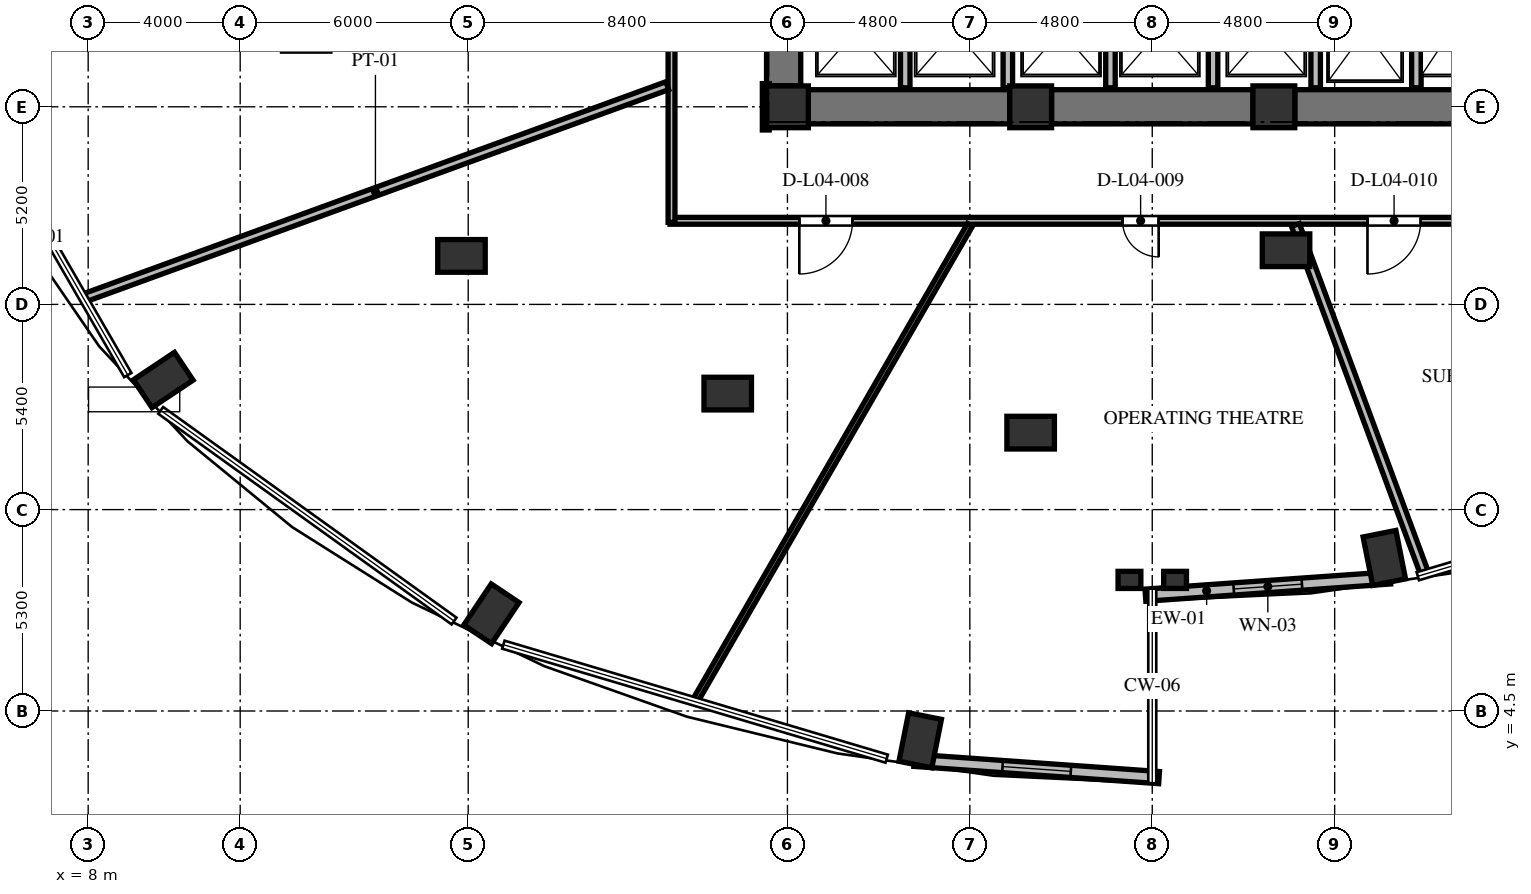
"""IFC4 building model, lengths in metres.
Left out: names, types, materials, properties, quantities, classifications, styles, units other than length and angle.
Written with IfcOpenShell. Run it as: python <this file> out.ifc"""

import sys

from ifc_helpers import new_model, si_unit, direction, frame, frame_2d, origin, origin_2d, place, context, subcontext, project, spatial, rectangle, extrude, element, fill, save


model = new_model("IFC4")
c1 = context("Model", 3, precision=1e-05, world=origin(), true_north=direction((0.0, 1.0)))
c2 = subcontext(c1, "Body", "Model", "MODEL_VIEW")
j1 = project(units=[si_unit("LENGTHUNIT", "METRE"), si_unit("PLANEANGLEUNIT", "RADIAN")], contexts=[c1])
p1 = place(None, origin())
s1 = spatial("IfcSite", under=j1, at=p1, CompositionType="ELEMENT")
p2 = place(p1, origin())
s2 = spatial("IfcBuilding", under=s1, at=p2, CompositionType="ELEMENT")
p3 = place(p2, frame((0.0, 0.0, 20.4)))
s3 = spatial("IfcBuildingStorey", under=s2, at=p3, CompositionType="ELEMENT", Elevation=20.4)
for number, where, z_axis, x_axis in (
    (1, (42.106, 8.529, 0.0), (0.0, 0.0, 1.0), (0.195, -0.981, 0.0)),
    (2, (9.975, 13.211, 0.0), (0.0, 0.0, 1.0), (-0.831, -0.556, 0.0)),
    (3, (18.611, 7.058, 0.0), (0.0, 0.0, 1.0), (-0.556, -0.831, 0.0)),
    (4, (29.894, 3.729, 0.0), (0.0, 0.0, 1.0), (-0.195, -0.981, 0.0)),
):
    element("IfcColumn", number, at=place(p3, frame(where, z_axis=z_axis, x_axis=x_axis)), inside=s3, PredefinedType="COLUMN", context=c2, shape_type="SweptSolid", body=[
        extrude(rectangle(XDim=1.3, YDim=0.88, at=origin_2d()), origin(), (0.0, 0.0, 1.0), 4.8),
    ])
for number, where, z_axis, x_axis in (
    (5, (26.4, 20.4, 0.0), (0.0, 0.0, 1.0), (1.0, 0.0, 0.0)),
    (6, (32.8, 20.4, 0.0), (0.0, 0.0, 1.0), (1.0, 0.0, 0.0)),
    (7, (39.2, 20.4, 0.0), (0.0, 0.0, 1.0), (1.0, 0.0, 0.0)),
):
    element("IfcColumn", number, at=place(p3, frame(where, z_axis=z_axis, x_axis=x_axis)), inside=s3, PredefinedType="COLUMN", context=c2, shape_type="SweptSolid", body=[
        extrude(rectangle(XDim=1.1, YDim=1.1, at=origin_2d()), origin(), (0.0, 0.0, 1.0), 4.8),
    ])
for number, where, z_axis, x_axis in (
    (8, (39.52, 16.625, 0.0), (0.0, 0.0, 1.0), (1.0, 0.0, 0.0)),
    (9, (17.823, 16.476, 0.0), (0.0, 0.0, 1.0), (1.0, 0.0, 0.0)),
    (10, (24.829, 12.853, 0.0), (0.0, 0.0, 1.0), (1.0, 0.0, 0.0)),
    (11, (32.8, 11.825, 0.0), (0.0, 0.0, 1.0), (1.0, 0.0, 0.0)),
):
    element("IfcColumn", number, at=place(p3, frame(where, z_axis=z_axis, x_axis=x_axis)), inside=s3, PredefinedType="COLUMN", context=c2, shape_type="SweptSolid", body=[
        extrude(rectangle(XDim=1.25, YDim=0.86, at=origin_2d()), origin(), (0.0, 0.0, 1.0), 4.8),
    ])
for number, where, z_axis, x_axis in (
    (12, (35.4, 7.95, 0.0), (0.0, 0.0, 1.0), (1.0, 0.0, 0.0)),
    (13, (36.6, 7.95, 0.0), (0.0, 0.0, 1.0), (1.0, 0.0, 0.0)),
):
    element("IfcColumn", number, at=place(p3, frame(where, z_axis=z_axis, x_axis=x_axis)), inside=s3, PredefinedType="PILASTER", context=c2, shape_type="SweptSolid", body=[
        extrude(rectangle(XDim=0.6, YDim=0.45, at=origin_2d()), origin(), (0.0, 0.0, 1.0), 4.8),
    ])
p4 = place(p3, frame((26.3, 20.95, 0.0), z_axis=(0.0, 0.0, 1.0), x_axis=(0.0, 1.0, 0.0)))
e14 = element("IfcWall", 14, at=p4, inside=s3, PredefinedType="SHEAR", context=c2, shape_type="SweptSolid", body=[
    extrude(rectangle(XDim=14.1, YDim=0.9, at=frame_2d((7.05, 0.0))), origin(), (0.0, 0.0, 1.0), 4.8),
])
p5 = place(p4, frame((6.5, 0.0, 0.0)))
e15 = element("IfcOpeningElement", 15, at=p5, cuts=e14, PredefinedType="OPENING", context=c2, shape_type="SweptSolid", body=[
    extrude(rectangle(XDim=1.2, YDim=2.15, at=frame_2d((0.6, 1.075))), frame((0.0, 0.46, 0.0), z_axis=(0.0, -1.0, 0.0), x_axis=(1.0, 0.0, 0.0)), (0.0, 0.0, 1.0), 0.92),
])
p6 = place(p4, frame((9.6, 0.0, 0.0)))
e16 = element("IfcOpeningElement", 16, at=p6, cuts=e14, PredefinedType="OPENING", context=c2, shape_type="SweptSolid", body=[
    extrude(rectangle(XDim=1.3, YDim=2.2, at=frame_2d((0.65, 1.1))), frame((0.0, 0.46, 0.0), z_axis=(0.0, -1.0, 0.0), x_axis=(1.0, 0.0, 0.0)), (0.0, 0.0, 1.0), 0.92),
])
p7 = place(p4, frame((3.26, 0.0, 0.0)))
e17 = element("IfcOpeningElement", 17, at=p7, cuts=e14, PredefinedType="OPENING", context=c2, shape_type="SweptSolid", body=[
    extrude(rectangle(XDim=1.3, YDim=2.2, at=frame_2d((0.65, 1.1))), frame((0.0, 0.46, 0.0), z_axis=(0.0, -1.0, 0.0), x_axis=(1.0, 0.0, 0.0)), (0.0, 0.0, 1.0), 0.92),
])
p8 = place(p3, frame((26.95, 20.4, 0.0), z_axis=(0.0, 0.0, 1.0), x_axis=(1.0, 0.0, 0.0)))
e18 = element("IfcWall", 18, at=p8, inside=s3, PredefinedType="SHEAR", context=c2, shape_type="SweptSolid", body=[
    extrude(rectangle(XDim=5.3, YDim=0.9, at=frame_2d((2.65, 0.0))), origin(), (0.0, 0.0, 1.0), 4.8),
])
p9 = place(p3, frame((33.35, 20.4, 0.0), z_axis=(0.0, 0.0, 1.0), x_axis=(1.0, 0.0, 0.0)))
e19 = element("IfcWall", 19, at=p9, inside=s3, PredefinedType="SHEAR", context=c2, shape_type="SweptSolid", body=[
    extrude(rectangle(XDim=5.3, YDim=0.9, at=frame_2d((2.65, 0.0))), origin(), (0.0, 0.0, 1.0), 4.8),
])
p10 = place(p3, frame((39.75, 20.4, 0.0), z_axis=(0.0, 0.0, 1.0), x_axis=(1.0, 0.0, 0.0)))
e20 = element("IfcWall", 20, at=p10, inside=s3, PredefinedType="SHEAR", context=c2, shape_type="SweptSolid", body=[
    extrude(rectangle(XDim=5.3, YDim=0.9, at=frame_2d((2.65, 0.0))), origin(), (0.0, 0.0, 1.0), 4.8),
])
p11 = place(p3, frame((35.82, 7.547, 0.0), z_axis=(0.0, 0.0, 1.0), x_axis=(0.99751367159, 0.070473221795, 0.0)))
e21 = element("IfcWall", 21, at=p11, inside=s3, PredefinedType="SOLIDWALL", context=c2, shape_type="SweptSolid", body=[
    extrude(rectangle(XDim=6.458, YDim=0.32, at=frame_2d((3.229, 0.0))), origin(), (0.0, 0.0, 1.0), 4.58),
])
p12 = place(p11, frame((2.329, 0.0, 0.85)))
e22 = element("IfcOpeningElement", 22, at=p12, cuts=e21, PredefinedType="OPENING", context=c2, shape_type="SweptSolid", body=[
    extrude(rectangle(XDim=1.8, YDim=2.4, at=frame_2d((0.9, 1.2))), frame((0.0, 0.17, 0.0), z_axis=(0.0, -1.0, 0.0), x_axis=(1.0, 0.0, 0.0)), (0.0, 0.0, 1.0), 0.34),
])
p13 = place(p3, frame((29.738, 3.202, 0.0), z_axis=(0.0, 0.0, 1.0), x_axis=(0.997513108184, -0.070481196075, 0.0)))
e23 = element("IfcWall", 23, at=p13, inside=s3, PredefinedType="SOLIDWALL", context=c2, shape_type="SweptSolid", body=[
    extrude(rectangle(XDim=6.457, YDim=0.32, at=frame_2d((3.229, 0.0))), origin(), (0.0, 0.0, 1.0), 4.58),
])
p14 = place(p13, frame((2.328, 0.0, 0.85)))
e24 = element("IfcOpeningElement", 24, at=p14, cuts=e23, PredefinedType="OPENING", context=c2, shape_type="SweptSolid", body=[
    extrude(rectangle(XDim=1.8, YDim=2.4, at=frame_2d((0.9, 1.2))), frame((0.0, 0.17, 0.0), z_axis=(0.0, -1.0, 0.0), x_axis=(1.0, 0.0, 0.0)), (0.0, 0.0, 1.0), 0.34),
])
p15 = place(p3, frame((42.95, 20.9, 0.0), z_axis=(0.0, 0.0, 1.0), x_axis=(0.0, 1.0, 0.0)))
e25 = element("IfcWall", 25, at=p15, inside=s3, PredefinedType="SOLIDWALL", context=c2, shape_type="SweptSolid", body=[
    extrude(rectangle(XDim=3.2, YDim=0.25, at=frame_2d((1.6, 0.0))), origin(), (0.0, 0.0, 1.0), 4.58),
])
for number, where, z_axis, x_axis in (
    (26, (29.5, 20.9, 0.0), (0.0, 0.0, 1.0), (0.0, 1.0, 0.0)),
    (27, (32.2, 20.9, 0.0), (0.0, 0.0, 1.0), (0.0, 1.0, 0.0)),
    (28, (34.9, 20.9, 0.0), (0.0, 0.0, 1.0), (0.0, 1.0, 0.0)),
    (29, (37.6, 20.9, 0.0), (0.0, 0.0, 1.0), (0.0, 1.0, 0.0)),
    (30, (40.3, 20.9, 0.0), (0.0, 0.0, 1.0), (0.0, 1.0, 0.0)),
):
    element("IfcWall", number, at=place(p3, frame(where, z_axis=z_axis, x_axis=x_axis)), inside=s3, PredefinedType="SOLIDWALL", context=c2, shape_type="SweptSolid", body=[
        extrude(rectangle(XDim=2.8, YDim=0.25, at=frame_2d((1.4, 0.0))), origin(), (0.0, 0.0, 1.0), 4.58),
    ])
p16 = place(p3, frame((25.83, 21.01, 0.0), z_axis=(0.0, 0.0, 1.0), x_axis=(0.0, -1.0, 0.0)))
e31 = element("IfcWall", 31, at=p16, inside=s3, PredefinedType="PARTITIONING", context=c2, shape_type="SweptSolid", body=[
    extrude(rectangle(XDim=1.22, YDim=0.18, at=frame_2d((0.61, 0.0))), origin(), (0.0, 0.0, 1.0), 4.58),
])
p17 = place(p3, frame((45.24, 17.4, 0.0), z_axis=(0.0, 0.0, 1.0), x_axis=(-1.0, 0.0, 0.0)))
e32 = element("IfcWall", 32, at=p17, inside=s3, PredefinedType="PARTITIONING", context=c2, shape_type="SweptSolid", body=[
    extrude(rectangle(XDim=21.93, YDim=0.18, at=frame_2d((10.965, 0.0))), origin(), (0.0, 0.0, 1.0), 4.58),
])
p18 = place(p17, frame((17.127, 0.0, 0.0)))
e33 = element("IfcOpeningElement", 33, at=p18, cuts=e32, PredefinedType="OPENING", context=c2, shape_type="SweptSolid", body=[
    extrude(rectangle(XDim=1.4, YDim=2.2, at=frame_2d((0.7, 1.1))), frame((0.0, 0.1, 0.0), z_axis=(0.0, -1.0, 0.0), x_axis=(1.0, 0.0, 0.0)), (0.0, 0.0, 1.0), 0.2),
])
p19 = place(p17, frame((9.071, 0.0, 0.0)))
e34 = element("IfcOpeningElement", 34, at=p19, cuts=e32, PredefinedType="OPENING", context=c2, shape_type="SweptSolid", body=[
    extrude(rectangle(XDim=0.95, YDim=2.1, at=frame_2d((0.475, 1.05))), frame((0.0, 0.1, 0.0), z_axis=(0.0, -1.0, 0.0), x_axis=(1.0, 0.0, 0.0)), (0.0, 0.0, 1.0), 0.2),
])
p20 = place(p17, frame((2.177, 0.0, 0.0)))
e35 = element("IfcOpeningElement", 35, at=p20, cuts=e32, PredefinedType="OPENING", context=c2, shape_type="SweptSolid", body=[
    extrude(rectangle(XDim=1.4, YDim=2.2, at=frame_2d((0.7, 1.1))), frame((0.0, 0.1, 0.0), z_axis=(0.0, -1.0, 0.0), x_axis=(1.0, 0.0, 0.0)), (0.0, 0.0, 1.0), 0.2),
])
p21 = place(p3, frame((23.35, 17.36, 0.0), z_axis=(0.0, 0.0, 1.0), x_axis=(0.0, 1.0, 0.0)))
e36 = element("IfcWall", 36, at=p21, inside=s3, PredefinedType="PARTITIONING", context=c2, shape_type="SweptSolid", body=[
    extrude(rectangle(XDim=9.28, YDim=0.18, at=frame_2d((4.64, 0.0))), origin(), (0.0, 0.0, 1.0), 4.58),
])
p22 = place(p3, frame((39.767, 17.29, 0.0), z_axis=(0.0, 0.0, 1.0), x_axis=(0.347365452064, -0.937729834607, 0.0)))
e37 = element("IfcWall", 37, at=p22, inside=s3, PredefinedType="PARTITIONING", context=c2, shape_type="SweptSolid", body=[
    extrude(rectangle(XDim=9.804, YDim=0.22, at=frame_2d((4.902, 0.0))), origin(), (0.0, 0.0, 1.0), 4.58),
])
p23 = place(p3, frame((23.239, 20.955, 0.0), z_axis=(0.0, 0.0, 1.0), x_axis=(-0.939696131956, -0.342010496311, 0.0)))
e38 = element("IfcWall", 38, at=p23, inside=s3, PredefinedType="PARTITIONING", context=c2, shape_type="SweptSolid", body=[
    extrude(rectangle(XDim=16.345, YDim=0.22, at=frame_2d((8.172, 0.0))), origin(), (0.0, 0.0, 1.0), 4.58),
])
p24 = place(p3, frame((31.204, 17.293, 0.0), z_axis=(0.0, 0.0, 1.0), x_axis=(-0.500008108359, -0.866020722371, 0.0)))
e39 = element("IfcWall", 39, at=p24, inside=s3, PredefinedType="PARTITIONING", context=c2, shape_type="SweptSolid", body=[
    extrude(rectangle(XDim=14.476, YDim=0.15, at=frame_2d((7.238, 0.0))), origin(), (0.0, 0.0, 1.0), 4.58),
])
p25 = place(p12, origin())
e40 = element("IfcWindow", 40, at=p25, inside=s3, PartitioningType="SINGLE_PANEL", PredefinedType="WINDOW", context=c2, shape_type="SweptSolid", body=[
    extrude(rectangle(XDim=1.8, YDim=2.4, at=frame_2d((0.9, 1.2))), frame((0.0, 0.03, 0.0), z_axis=(0.0, -1.0, 0.0), x_axis=(1.0, 0.0, 0.0)), (0.0, 0.0, 1.0), 0.06),
])
fill(e22, e40)
p26 = place(p14, origin())
e41 = element("IfcWindow", 41, at=p26, inside=s3, PartitioningType="SINGLE_PANEL", PredefinedType="WINDOW", context=c2, shape_type="SweptSolid", body=[
    extrude(rectangle(XDim=1.8, YDim=2.4, at=frame_2d((0.9, 1.2))), frame((0.0, 0.03, 0.0), z_axis=(0.0, -1.0, 0.0), x_axis=(1.0, 0.0, 0.0)), (0.0, 0.0, 1.0), 0.06),
])
fill(e24, e41)
p27 = place(p18, origin())
e42 = element("IfcDoor", 42, at=p27, inside=s3, OperationType="SINGLE_SWING_RIGHT", PredefinedType="DOOR", context=c2, shape_type="SweptSolid", body=[
    extrude(rectangle(XDim=1.4, YDim=2.2, at=frame_2d((0.7, 1.1))), frame((0.0, 0.025, 0.0), z_axis=(0.0, -1.0, 0.0), x_axis=(1.0, 0.0, 0.0)), (0.0, 0.0, 1.0), 0.05),
])
fill(e33, e42)
p28 = place(p19, origin())
e43 = element("IfcDoor", 43, at=p28, inside=s3, OperationType="SINGLE_SWING_LEFT", PredefinedType="DOOR", context=c2, shape_type="SweptSolid", body=[
    extrude(rectangle(XDim=0.95, YDim=2.1, at=frame_2d((0.475, 1.05))), frame((0.0, 0.025, 0.0), z_axis=(0.0, -1.0, 0.0), x_axis=(1.0, 0.0, 0.0)), (0.0, 0.0, 1.0), 0.05),
])
fill(e34, e43)
p29 = place(p20, origin())
e44 = element("IfcDoor", 44, at=p29, inside=s3, OperationType="SINGLE_SWING_RIGHT", PredefinedType="DOOR", context=c2, shape_type="SweptSolid", body=[
    extrude(rectangle(XDim=1.4, YDim=2.2, at=frame_2d((0.7, 1.1))), frame((0.0, 0.025, 0.0), z_axis=(0.0, -1.0, 0.0), x_axis=(1.0, 0.0, 0.0)), (0.0, 0.0, 1.0), 0.05),
])
fill(e35, e44)
save(model, sys.argv[1])
